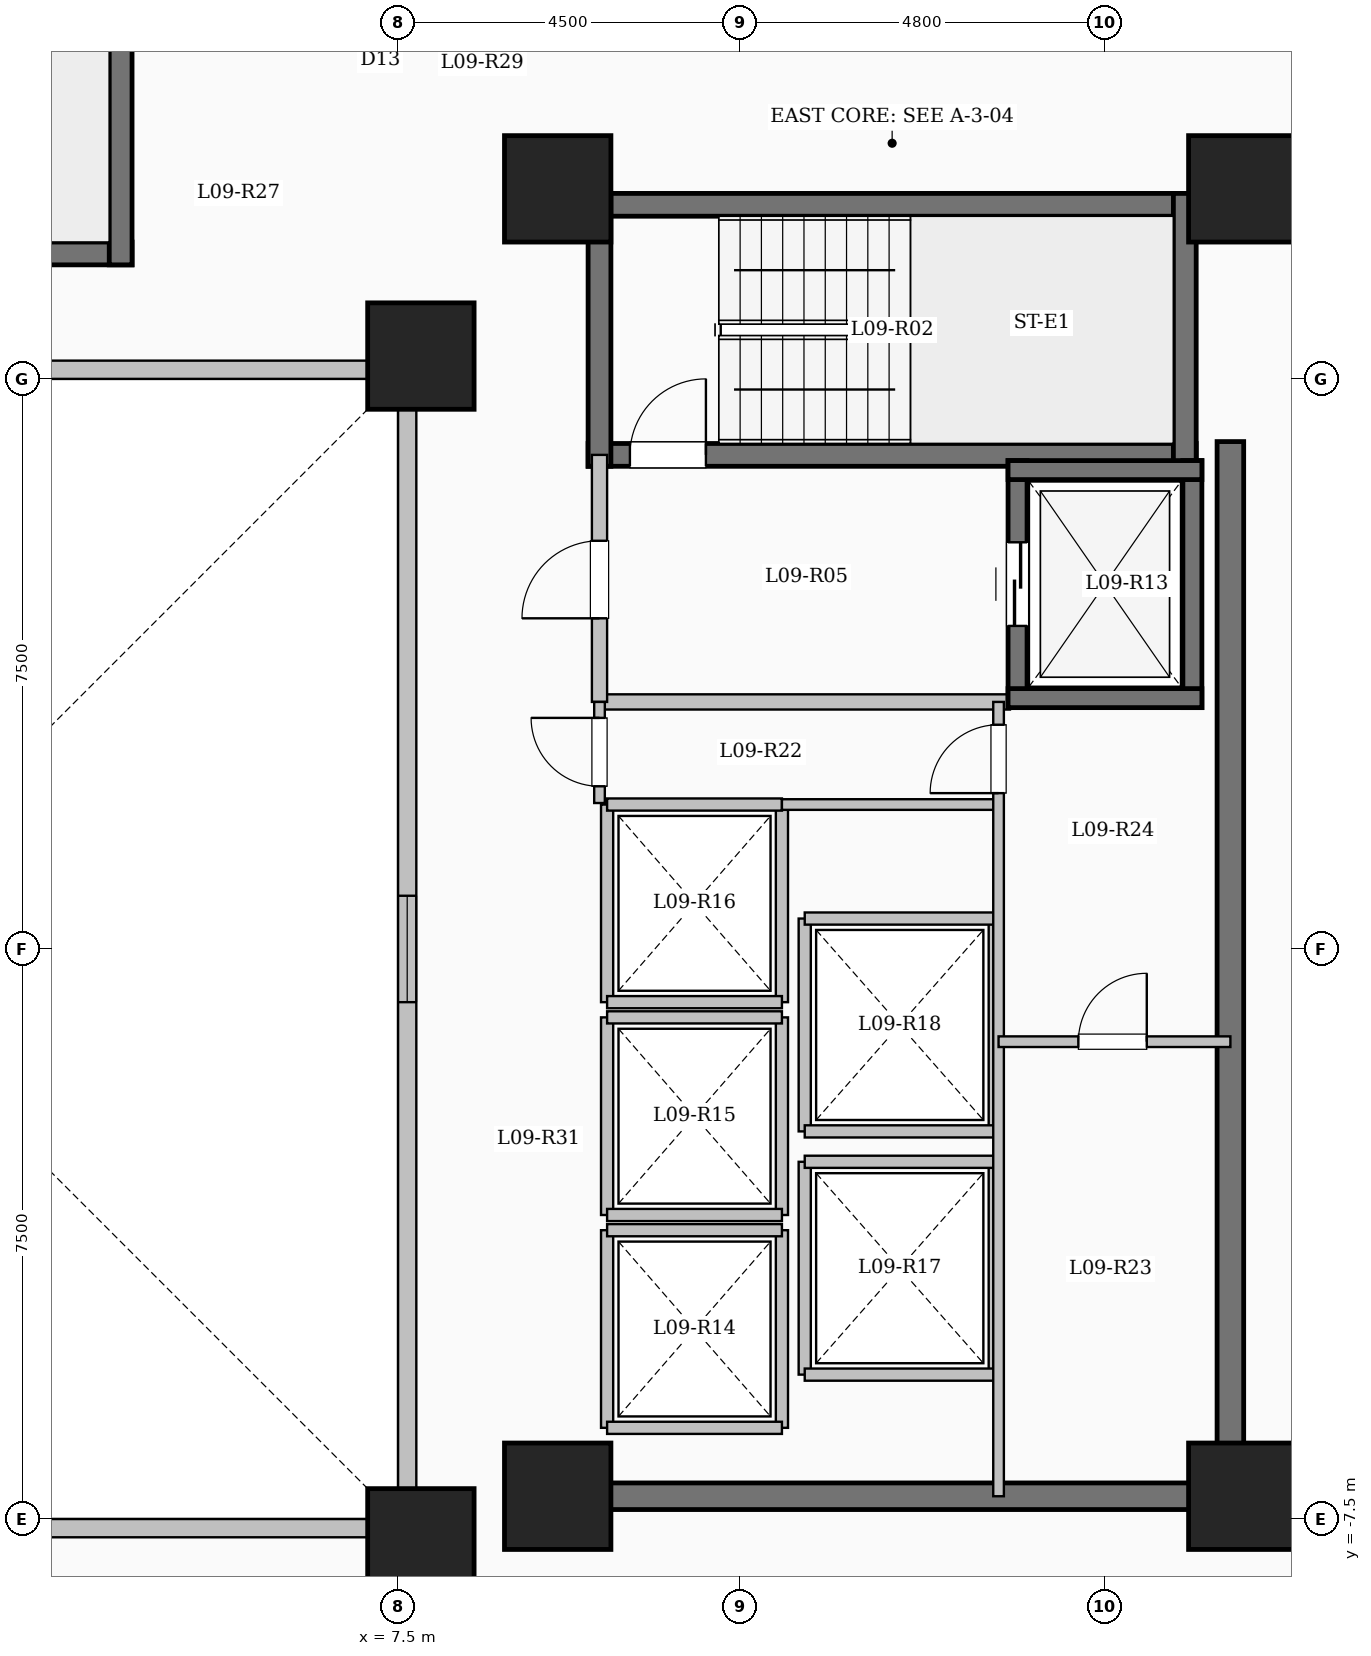
"""IFC4 building model, lengths in metres.
Left out: names, types, materials, properties, quantities, classifications, styles, units other than length and angle.
Written with IfcOpenShell. Run it as: python <this file> out.ifc"""

import sys

from ifc_helpers import new_model, si_unit, direction, frame, frame_2d, origin, origin_2d, place, context, subcontext, project, spatial, rectangle, extrude, element, fill, save


model = new_model("IFC4")
c1 = context("Model", 3, precision=1e-05, world=origin(), true_north=direction((0.0, 1.0)))
c2 = subcontext(c1, "Body", "Model", "MODEL_VIEW")
j1 = project(units=[si_unit("LENGTHUNIT", "METRE"), si_unit("PLANEANGLEUNIT", "RADIAN")], contexts=[c1])
p1 = place(None, origin())
s1 = spatial("IfcSite", under=j1, at=p1, CompositionType="ELEMENT")
p2 = place(p1, origin())
s2 = spatial("IfcBuilding", under=s1, at=p2, CompositionType="ELEMENT")
p3 = place(p2, frame((0.0, 0.0, 37.4)))
s3 = spatial("IfcBuildingStorey", under=s2, at=p3, CompositionType="ELEMENT", Elevation=37.4)
for number, where, z_axis, x_axis in (
    (1, (7.8, -7.8, 0.0), (0.0, 0.0, 1.0), (1.0, 0.0, 0.0)),
    (2, (7.8, 7.8, 0.0), (0.0, 0.0, 1.0), (1.0, 0.0, 0.0)),
    (3, (9.6, -7.2, 0.0), (0.0, 0.0, 1.0), (1.0, 0.0, 0.0)),
    (4, (9.6, 10.0, 0.0), (0.0, 0.0, 1.0), (1.0, 0.0, 0.0)),
    (5, (18.6, -7.2, 0.0), (0.0, 0.0, 1.0), (1.0, 0.0, 0.0)),
    (6, (18.6, 10.0, 0.0), (0.0, 0.0, 1.0), (1.0, 0.0, 0.0)),
):
    element("IfcColumn", number, at=place(p3, frame(where, z_axis=z_axis, x_axis=x_axis)), inside=s3, PredefinedType="COLUMN", context=c2, shape_type="SweptSolid", body=[
        extrude(rectangle(XDim=1.4, YDim=1.4, at=origin_2d()), origin(), (0.0, 0.0, 1.0), 3.35),
    ])
p4 = place(p3, frame((-7.62, -7.62, 0.0), z_axis=(0.0, 0.0, 1.0), x_axis=(1.0, 0.0, 0.0)))
e7 = element("IfcWall", 7, at=p4, inside=s3, PredefinedType="SOLIDWALL", context=c2, shape_type="SweptSolid", body=[
    extrude(rectangle(XDim=15.24, YDim=0.24, at=frame_2d((7.62, 0.0))), origin(), (0.0, 0.0, 1.0), 3.1),
])
p5 = place(p4, frame((6.92, 0.0, 0.95)))
e8 = element("IfcOpeningElement", 8, at=p5, cuts=e7, PredefinedType="OPENING", context=c2, shape_type="SweptSolid", body=[
    extrude(rectangle(XDim=1.4, YDim=1.5, at=frame_2d((0.7, 0.75))), frame((0.0, 0.13, 0.0), z_axis=(0.0, -1.0, 0.0), x_axis=(1.0, 0.0, 0.0)), (0.0, 0.0, 1.0), 0.26),
])
p6 = place(p3, frame((7.62, -7.62, 0.0), z_axis=(0.0, 0.0, 1.0), x_axis=(0.0, 1.0, 0.0)))
e9 = element("IfcWall", 9, at=p6, inside=s3, PredefinedType="SOLIDWALL", context=c2, shape_type="SweptSolid", body=[
    extrude(rectangle(XDim=15.24, YDim=0.24, at=frame_2d((7.62, 0.0))), origin(), (0.0, 0.0, 1.0), 3.1),
])
p7 = place(p6, frame((6.92, 0.0, 0.95)))
e10 = element("IfcOpeningElement", 10, at=p7, cuts=e9, PredefinedType="OPENING", context=c2, shape_type="SweptSolid", body=[
    extrude(rectangle(XDim=1.4, YDim=1.5, at=frame_2d((0.7, 0.75))), frame((0.0, 0.13, 0.0), z_axis=(0.0, -1.0, 0.0), x_axis=(1.0, 0.0, 0.0)), (0.0, 0.0, 1.0), 0.26),
])
p8 = place(p3, frame((7.62, 7.62, 0.0), z_axis=(0.0, 0.0, 1.0), x_axis=(-1.0, 0.0, 0.0)))
e11 = element("IfcWall", 11, at=p8, inside=s3, PredefinedType="SOLIDWALL", context=c2, shape_type="SweptSolid", body=[
    extrude(rectangle(XDim=15.24, YDim=0.24, at=frame_2d((7.62, 0.0))), origin(), (0.0, 0.0, 1.0), 3.1),
])
p9 = place(p8, frame((6.92, 0.0, 0.95)))
e12 = element("IfcOpeningElement", 12, at=p9, cuts=e11, PredefinedType="OPENING", context=c2, shape_type="SweptSolid", body=[
    extrude(rectangle(XDim=1.4, YDim=1.5, at=frame_2d((0.7, 0.75))), frame((0.0, 0.13, 0.0), z_axis=(0.0, -1.0, 0.0), x_axis=(1.0, 0.0, 0.0)), (0.0, 0.0, 1.0), 0.26),
])
p10 = place(p3, frame((10.0, 9.79, 0.0), z_axis=(0.0, 0.0, 1.0), x_axis=(1.0, 0.0, 0.0)))
e13 = element("IfcWall", 13, at=p10, inside=s3, PredefinedType="SHEAR", context=c2, shape_type="SweptSolid", body=[
    extrude(rectangle(XDim=8.0, YDim=0.3, at=frame_2d((4.0, 0.0))), origin(), (0.0, 0.0, 1.0), 3.35),
])
p11 = place(p3, frame((10.0, 6.5, 0.0), z_axis=(0.0, 0.0, 1.0), x_axis=(1.0, 0.0, 0.0)))
e14 = element("IfcWall", 14, at=p11, inside=s3, PredefinedType="SHEAR", context=c2, shape_type="SweptSolid", body=[
    extrude(rectangle(XDim=8.0, YDim=0.3, at=frame_2d((4.0, 0.0))), origin(), (0.0, 0.0, 1.0), 3.35),
])
p12 = place(p11, frame((0.55, 0.0, 0.0)))
e15 = element("IfcOpeningElement", 15, at=p12, cuts=e14, PredefinedType="OPENING", context=c2, shape_type="SweptSolid", body=[
    extrude(rectangle(XDim=1.0, YDim=2.15, at=frame_2d((0.5, 1.075))), frame((0.0, 0.16, 0.0), z_axis=(0.0, -1.0, 0.0), x_axis=(1.0, 0.0, 0.0)), (0.0, 0.0, 1.0), 0.32),
])
for number, where, z_axis, x_axis in (
    (16, (10.15, 6.35, 0.0), (0.0, 0.0, 1.0), (0.0, 1.0, 0.0)),
    (17, (17.85, 6.35, 0.0), (0.0, 0.0, 1.0), (0.0, 1.0, 0.0)),
):
    element("IfcWall", number, at=place(p3, frame(where, z_axis=z_axis, x_axis=x_axis)), inside=s3, PredefinedType="SHEAR", context=c2, shape_type="SweptSolid", body=[
        extrude(rectangle(XDim=3.59, YDim=0.3, at=frame_2d((1.795, 0.0))), origin(), (0.0, 0.0, 1.0), 3.35),
    ])
p13 = place(p3, frame((-4.0, 9.15, 0.0), z_axis=(0.0, 0.0, 1.0), x_axis=(1.0, 0.0, 0.0)))
e18 = element("IfcWall", 18, at=p13, inside=s3, PredefinedType="SHEAR", context=c2, shape_type="SweptSolid", body=[
    extrude(rectangle(XDim=8.0, YDim=0.3, at=frame_2d((4.0, 0.0))), origin(), (0.0, 0.0, 1.0), 3.35),
])
p14 = place(p13, frame((0.55, 0.0, 0.0)))
e19 = element("IfcOpeningElement", 19, at=p14, cuts=e18, PredefinedType="OPENING", context=c2, shape_type="SweptSolid", body=[
    extrude(rectangle(XDim=1.0, YDim=2.15, at=frame_2d((0.5, 1.075))), frame((0.0, 0.16, 0.0), z_axis=(0.0, -1.0, 0.0), x_axis=(1.0, 0.0, 0.0)), (0.0, 0.0, 1.0), 0.32),
])
p15 = place(p3, frame((3.85, 9.0, 0.0), z_axis=(0.0, 0.0, 1.0), x_axis=(0.0, 1.0, 0.0)))
e20 = element("IfcWall", 20, at=p15, inside=s3, PredefinedType="SHEAR", context=c2, shape_type="SweptSolid", body=[
    extrude(rectangle(XDim=3.59, YDim=0.3, at=frame_2d((1.795, 0.0))), origin(), (0.0, 0.0, 1.0), 3.35),
])
p16 = place(p3, frame((10.15, 3.25, 0.0), z_axis=(0.0, 0.0, 1.0), x_axis=(1.0, 0.0, 0.0)))
e21 = element("IfcWall", 21, at=p16, inside=s3, PredefinedType="SOLIDWALL", context=c2, shape_type="SweptSolid", body=[
    extrude(rectangle(XDim=5.4, YDim=0.2, at=frame_2d((2.7, 0.0))), origin(), (0.0, 0.0, 1.0), 3.1),
])
p17 = place(p3, frame((10.15, 3.25, 0.0), z_axis=(0.0, 0.0, 1.0), x_axis=(0.0, 1.0, 0.0)))
e22 = element("IfcWall", 22, at=p17, inside=s3, PredefinedType="SOLIDWALL", context=c2, shape_type="SweptSolid", body=[
    extrude(rectangle(XDim=3.25, YDim=0.2, at=frame_2d((1.625, 0.0))), origin(), (0.0, 0.0, 1.0), 3.1),
])
p18 = place(p17, frame((1.1, 0.0, 0.0)))
e23 = element("IfcOpeningElement", 23, at=p18, cuts=e22, PredefinedType="OPENING", context=c2, shape_type="SweptSolid", body=[
    extrude(rectangle(XDim=1.02, YDim=2.15, at=frame_2d((0.51, 1.075))), frame((0.0, 0.11, 0.0), z_axis=(0.0, -1.0, 0.0), x_axis=(1.0, 0.0, 0.0)), (0.0, 0.0, 1.0), 0.22),
])
p19 = place(p3, frame((15.65, 3.175, 0.0), z_axis=(0.0, 0.0, 1.0), x_axis=(0.0, 1.0, 0.0)))
e24 = element("IfcWall", 24, at=p19, inside=s3, PredefinedType="SHEAR", context=c2, shape_type="SweptSolid", body=[
    extrude(rectangle(XDim=3.25, YDim=0.25, at=frame_2d((1.625, 0.0))), origin(), (0.0, 0.0, 1.0), 3.35),
])
p20 = place(p19, frame((1.075, 0.0, 0.0)))
e25 = element("IfcOpeningElement", 25, at=p20, cuts=e24, PredefinedType="OPENING", context=c2, shape_type="SweptSolid", body=[
    extrude(rectangle(XDim=1.1, YDim=2.15, at=frame_2d((0.55, 1.075))), frame((0.0, 0.135, 0.0), z_axis=(0.0, -1.0, 0.0), x_axis=(1.0, 0.0, 0.0)), (0.0, 0.0, 1.0), 0.27),
])
p21 = place(p3, frame((17.95, 3.175, 0.0), z_axis=(0.0, 0.0, 1.0), x_axis=(0.0, 1.0, 0.0)))
e26 = element("IfcWall", 26, at=p21, inside=s3, PredefinedType="SHEAR", context=c2, shape_type="SweptSolid", body=[
    extrude(rectangle(XDim=3.25, YDim=0.25, at=frame_2d((1.625, 0.0))), origin(), (0.0, 0.0, 1.0), 3.35),
])
for number, where, z_axis, x_axis in (
    (27, (15.525, 3.3, 0.0), (0.0, 0.0, 1.0), (1.0, 0.0, 0.0)),
    (28, (15.525, 6.3, 0.0), (0.0, 0.0, 1.0), (1.0, 0.0, 0.0)),
):
    element("IfcWall", number, at=place(p3, frame(where, z_axis=z_axis, x_axis=x_axis)), inside=s3, PredefinedType="SHEAR", context=c2, shape_type="SweptSolid", body=[
        extrude(rectangle(XDim=2.55, YDim=0.25, at=frame_2d((1.275, 0.0))), origin(), (0.0, 0.0, 1.0), 3.35),
    ])
for number, where, z_axis, x_axis in (
    (29, (10.25, -6.3, 0.0), (0.0, 0.0, 1.0), (0.0, 1.0, 0.0)),
    (30, (12.55, -6.3, 0.0), (0.0, 0.0, 1.0), (0.0, 1.0, 0.0)),
):
    element("IfcWall", number, at=place(p3, frame(where, z_axis=z_axis, x_axis=x_axis)), inside=s3, PredefinedType="SOLIDWALL", context=c2, shape_type="SweptSolid", body=[
        extrude(rectangle(XDim=2.6, YDim=0.16, at=frame_2d((1.3, 0.0))), origin(), (0.0, 0.0, 1.0), 3.1),
    ])
for number, where, z_axis, x_axis in (
    (31, (10.25, -6.3, 0.0), (0.0, 0.0, 1.0), (1.0, 0.0, 0.0)),
    (32, (10.25, -3.7, 0.0), (0.0, 0.0, 1.0), (1.0, 0.0, 0.0)),
):
    element("IfcWall", number, at=place(p3, frame(where, z_axis=z_axis, x_axis=x_axis)), inside=s3, PredefinedType="SOLIDWALL", context=c2, shape_type="SweptSolid", body=[
        extrude(rectangle(XDim=2.3, YDim=0.16, at=frame_2d((1.15, 0.0))), origin(), (0.0, 0.0, 1.0), 3.1),
    ])
for number, where, z_axis, x_axis in (
    (33, (10.25, -3.5, 0.0), (0.0, 0.0, 1.0), (0.0, 1.0, 0.0)),
    (34, (12.55, -3.5, 0.0), (0.0, 0.0, 1.0), (0.0, 1.0, 0.0)),
):
    element("IfcWall", number, at=place(p3, frame(where, z_axis=z_axis, x_axis=x_axis)), inside=s3, PredefinedType="SOLIDWALL", context=c2, shape_type="SweptSolid", body=[
        extrude(rectangle(XDim=2.6, YDim=0.16, at=frame_2d((1.3, 0.0))), origin(), (0.0, 0.0, 1.0), 3.1),
    ])
for number, where, z_axis, x_axis in (
    (35, (10.25, -3.5, 0.0), (0.0, 0.0, 1.0), (1.0, 0.0, 0.0)),
    (36, (10.25, -0.9, 0.0), (0.0, 0.0, 1.0), (1.0, 0.0, 0.0)),
):
    element("IfcWall", number, at=place(p3, frame(where, z_axis=z_axis, x_axis=x_axis)), inside=s3, PredefinedType="SOLIDWALL", context=c2, shape_type="SweptSolid", body=[
        extrude(rectangle(XDim=2.3, YDim=0.16, at=frame_2d((1.15, 0.0))), origin(), (0.0, 0.0, 1.0), 3.1),
    ])
for number, where, z_axis, x_axis in (
    (37, (10.25, -0.7, 0.0), (0.0, 0.0, 1.0), (0.0, 1.0, 0.0)),
    (38, (12.55, -0.7, 0.0), (0.0, 0.0, 1.0), (0.0, 1.0, 0.0)),
):
    element("IfcWall", number, at=place(p3, frame(where, z_axis=z_axis, x_axis=x_axis)), inside=s3, PredefinedType="SOLIDWALL", context=c2, shape_type="SweptSolid", body=[
        extrude(rectangle(XDim=2.6, YDim=0.16, at=frame_2d((1.3, 0.0))), origin(), (0.0, 0.0, 1.0), 3.1),
    ])
for number, where, z_axis, x_axis in (
    (39, (10.25, -0.7, 0.0), (0.0, 0.0, 1.0), (1.0, 0.0, 0.0)),
    (40, (10.25, 1.9, 0.0), (0.0, 0.0, 1.0), (1.0, 0.0, 0.0)),
):
    element("IfcWall", number, at=place(p3, frame(where, z_axis=z_axis, x_axis=x_axis)), inside=s3, PredefinedType="SOLIDWALL", context=c2, shape_type="SweptSolid", body=[
        extrude(rectangle(XDim=2.3, YDim=0.16, at=frame_2d((1.15, 0.0))), origin(), (0.0, 0.0, 1.0), 3.1),
    ])
for number, where, z_axis, x_axis in (
    (41, (12.85, -5.6, 0.0), (0.0, 0.0, 1.0), (0.0, 1.0, 0.0)),
    (42, (15.35, -5.6, 0.0), (0.0, 0.0, 1.0), (0.0, 1.0, 0.0)),
):
    element("IfcWall", number, at=place(p3, frame(where, z_axis=z_axis, x_axis=x_axis)), inside=s3, PredefinedType="SOLIDWALL", context=c2, shape_type="SweptSolid", body=[
        extrude(rectangle(XDim=2.8, YDim=0.16, at=frame_2d((1.4, 0.0))), origin(), (0.0, 0.0, 1.0), 3.1),
    ])
for number, where, z_axis, x_axis in (
    (43, (12.85, -5.6, 0.0), (0.0, 0.0, 1.0), (1.0, 0.0, 0.0)),
    (44, (12.85, -2.8, 0.0), (0.0, 0.0, 1.0), (1.0, 0.0, 0.0)),
):
    element("IfcWall", number, at=place(p3, frame(where, z_axis=z_axis, x_axis=x_axis)), inside=s3, PredefinedType="SOLIDWALL", context=c2, shape_type="SweptSolid", body=[
        extrude(rectangle(XDim=2.5, YDim=0.16, at=frame_2d((1.25, 0.0))), origin(), (0.0, 0.0, 1.0), 3.1),
    ])
for number, where, z_axis, x_axis in (
    (45, (12.85, -2.4, 0.0), (0.0, 0.0, 1.0), (0.0, 1.0, 0.0)),
    (46, (15.35, -2.4, 0.0), (0.0, 0.0, 1.0), (0.0, 1.0, 0.0)),
):
    element("IfcWall", number, at=place(p3, frame(where, z_axis=z_axis, x_axis=x_axis)), inside=s3, PredefinedType="SOLIDWALL", context=c2, shape_type="SweptSolid", body=[
        extrude(rectangle(XDim=2.8, YDim=0.16, at=frame_2d((1.4, 0.0))), origin(), (0.0, 0.0, 1.0), 3.1),
    ])
for number, where, z_axis, x_axis in (
    (47, (12.85, -2.4, 0.0), (0.0, 0.0, 1.0), (1.0, 0.0, 0.0)),
    (48, (12.85, 0.4, 0.0), (0.0, 0.0, 1.0), (1.0, 0.0, 0.0)),
):
    element("IfcWall", number, at=place(p3, frame(where, z_axis=z_axis, x_axis=x_axis)), inside=s3, PredefinedType="SOLIDWALL", context=c2, shape_type="SweptSolid", body=[
        extrude(rectangle(XDim=2.5, YDim=0.16, at=frame_2d((1.25, 0.0))), origin(), (0.0, 0.0, 1.0), 3.1),
    ])
p22 = place(p3, frame((18.45, -7.375, 0.0), z_axis=(0.0, 0.0, 1.0), x_axis=(0.0, 1.0, 0.0)))
e49 = element("IfcWall", 49, at=p22, inside=s3, PredefinedType="SHEAR", context=c2, shape_type="SweptSolid", body=[
    extrude(rectangle(XDim=14.05, YDim=0.35, at=frame_2d((7.025, 0.0))), origin(), (0.0, 0.0, 1.0), 3.35),
])
p23 = place(p3, frame((10.075, -7.2, 0.0), z_axis=(0.0, 0.0, 1.0), x_axis=(1.0, 0.0, 0.0)))
e50 = element("IfcWall", 50, at=p23, inside=s3, PredefinedType="SHEAR", context=c2, shape_type="SweptSolid", body=[
    extrude(rectangle(XDim=8.55, YDim=0.35, at=frame_2d((4.275, 0.0))), origin(), (0.0, 0.0, 1.0), 3.35),
])
p24 = place(p3, frame((12.55, 1.9, 0.0), z_axis=(0.0, 0.0, 1.0), x_axis=(1.0, 0.0, 0.0)))
e51 = element("IfcWall", 51, at=p24, inside=s3, PredefinedType="PARTITIONING", context=c2, shape_type="SweptSolid", body=[
    extrude(rectangle(XDim=2.85, YDim=0.14, at=frame_2d((1.425, 0.0))), origin(), (0.0, 0.0, 1.0), 3.1),
])
p25 = place(p3, frame((10.15, 1.92, 0.0), z_axis=(0.0, 0.0, 1.0), x_axis=(0.0, 1.0, 0.0)))
e52 = element("IfcWall", 52, at=p25, inside=s3, PredefinedType="PARTITIONING", context=c2, shape_type="SweptSolid", body=[
    extrude(rectangle(XDim=1.33, YDim=0.14, at=frame_2d((0.665, 0.0))), origin(), (0.0, 0.0, 1.0), 3.1),
])
p26 = place(p25, frame((0.22, 0.0, 0.0)))
e53 = element("IfcOpeningElement", 53, at=p26, cuts=e52, PredefinedType="OPENING", context=c2, shape_type="SweptSolid", body=[
    extrude(rectangle(XDim=0.9, YDim=2.08, at=frame_2d((0.45, 1.04))), frame((0.0, 0.08, 0.0), z_axis=(0.0, -1.0, 0.0), x_axis=(1.0, 0.0, 0.0)), (0.0, 0.0, 1.0), 0.16),
])
p27 = place(p3, frame((15.4, -7.2, 0.0), z_axis=(0.0, 0.0, 1.0), x_axis=(0.0, 1.0, 0.0)))
e54 = element("IfcWall", 54, at=p27, inside=s3, PredefinedType="PARTITIONING", context=c2, shape_type="SweptSolid", body=[
    extrude(rectangle(XDim=10.45, YDim=0.14, at=frame_2d((5.225, 0.0))), origin(), (0.0, 0.0, 1.0), 3.1),
])
p28 = place(p27, frame((9.25, 0.0, 0.0)))
e55 = element("IfcOpeningElement", 55, at=p28, cuts=e54, PredefinedType="OPENING", context=c2, shape_type="SweptSolid", body=[
    extrude(rectangle(XDim=0.9, YDim=2.08, at=frame_2d((0.45, 1.04))), frame((0.0, 0.08, 0.0), z_axis=(0.0, -1.0, 0.0), x_axis=(1.0, 0.0, 0.0)), (0.0, 0.0, 1.0), 0.16),
])
p29 = place(p3, frame((15.4, -1.22, 0.0), z_axis=(0.0, 0.0, 1.0), x_axis=(1.0, 0.0, 0.0)))
e56 = element("IfcWall", 56, at=p29, inside=s3, PredefinedType="PARTITIONING", context=c2, shape_type="SweptSolid", body=[
    extrude(rectangle(XDim=3.05, YDim=0.14, at=frame_2d((1.525, 0.0))), origin(), (0.0, 0.0, 1.0), 3.1),
])
p30 = place(p29, frame((1.05, 0.0, 0.0)))
e57 = element("IfcOpeningElement", 57, at=p30, cuts=e56, PredefinedType="OPENING", context=c2, shape_type="SweptSolid", body=[
    extrude(rectangle(XDim=0.9, YDim=2.08, at=frame_2d((0.45, 1.04))), frame((0.0, 0.08, 0.0), z_axis=(0.0, -1.0, 0.0), x_axis=(1.0, 0.0, 0.0)), (0.0, 0.0, 1.0), 0.16),
])
p31 = place(p7, origin())
e58 = element("IfcWindow", 58, at=p31, inside=s3, PartitioningType="SINGLE_PANEL", PredefinedType="WINDOW", context=c2, shape_type="SweptSolid", body=[
    extrude(rectangle(XDim=1.4, YDim=1.5, at=frame_2d((0.7, 0.75))), frame((0.0, 0.03, 0.0), z_axis=(0.0, -1.0, 0.0), x_axis=(1.0, 0.0, 0.0)), (0.0, 0.0, 1.0), 0.06),
])
fill(e10, e58)
p32 = place(p12, origin())
e59 = element("IfcDoor", 59, at=p32, inside=s3, OperationType="SINGLE_SWING_RIGHT", PredefinedType="DOOR", context=c2, shape_type="SweptSolid", body=[
    extrude(rectangle(XDim=1.0, YDim=2.15, at=frame_2d((0.5, 1.075))), frame((0.0, 0.025, 0.0), z_axis=(0.0, -1.0, 0.0), x_axis=(1.0, 0.0, 0.0)), (0.0, 0.0, 1.0), 0.05),
])
fill(e15, e59)
p33 = place(p18, origin())
e60 = element("IfcDoor", 60, at=p33, inside=s3, OperationType="SINGLE_SWING_LEFT", PredefinedType="DOOR", context=c2, shape_type="SweptSolid", body=[
    extrude(rectangle(XDim=1.02, YDim=2.15, at=frame_2d((0.51, 1.075))), frame((0.0, 0.025, 0.0), z_axis=(0.0, -1.0, 0.0), x_axis=(1.0, 0.0, 0.0)), (0.0, 0.0, 1.0), 0.05),
])
fill(e23, e60)
p34 = place(p20, origin())
e61 = element("IfcDoor", 61, at=p34, inside=s3, OperationType="SLIDING_TO_LEFT", PredefinedType="DOOR", context=c2, shape_type="SweptSolid", body=[
    extrude(rectangle(XDim=1.1, YDim=2.15, at=frame_2d((0.55, 1.075))), frame((0.0, 0.025, 0.0), z_axis=(0.0, -1.0, 0.0), x_axis=(1.0, 0.0, 0.0)), (0.0, 0.0, 1.0), 0.05),
])
fill(e25, e61)
p35 = place(p26, origin())
e62 = element("IfcDoor", 62, at=p35, inside=s3, OperationType="SINGLE_SWING_RIGHT", PredefinedType="DOOR", context=c2, shape_type="SweptSolid", body=[
    extrude(rectangle(XDim=0.9, YDim=2.08, at=frame_2d((0.45, 1.04))), frame((0.0, 0.025, 0.0), z_axis=(0.0, -1.0, 0.0), x_axis=(1.0, 0.0, 0.0)), (0.0, 0.0, 1.0), 0.05),
])
fill(e53, e62)
p36 = place(p28, origin())
e63 = element("IfcDoor", 63, at=p36, inside=s3, OperationType="SINGLE_SWING_LEFT", PredefinedType="DOOR", context=c2, shape_type="SweptSolid", body=[
    extrude(rectangle(XDim=0.9, YDim=2.08, at=frame_2d((0.45, 1.04))), frame((0.0, 0.025, 0.0), z_axis=(0.0, -1.0, 0.0), x_axis=(1.0, 0.0, 0.0)), (0.0, 0.0, 1.0), 0.05),
])
fill(e55, e63)
p37 = place(p30, origin())
e64 = element("IfcDoor", 64, at=p37, inside=s3, OperationType="SINGLE_SWING_RIGHT", PredefinedType="DOOR", context=c2, shape_type="SweptSolid", body=[
    extrude(rectangle(XDim=0.9, YDim=2.08, at=frame_2d((0.45, 1.04))), frame((0.0, 0.025, 0.0), z_axis=(0.0, -1.0, 0.0), x_axis=(1.0, 0.0, 0.0)), (0.0, 0.0, 1.0), 0.05),
])
fill(e57, e64)
save(model, sys.argv[1])
